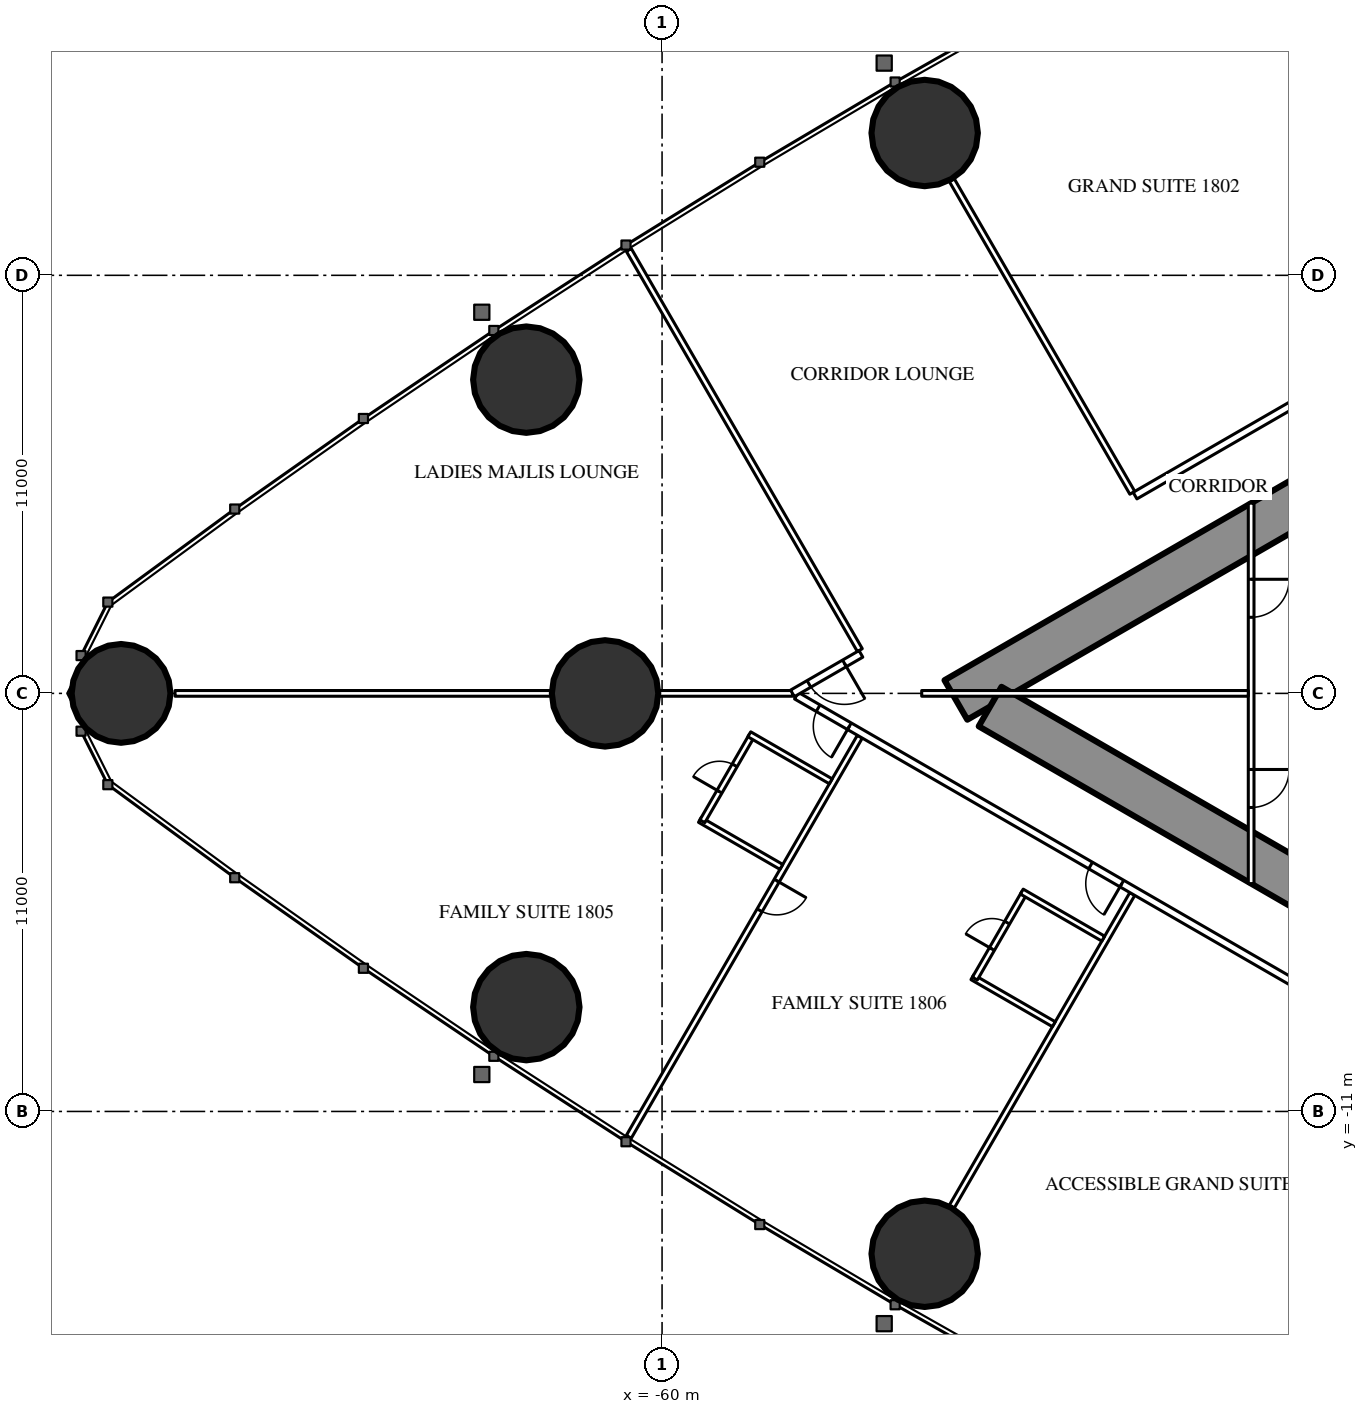
"""IFC4 building model, lengths in metres.
Left out: names, types, materials, properties, quantities, classifications, styles, units other than length and angle.
Written with IfcOpenShell. Run it as: python <this file> out.ifc"""

import sys

from ifc_helpers import new_model, si_unit, direction, frame, frame_2d, origin, origin_2d, place, context, subcontext, project, spatial, rectangle, hollow_circle, extrude, element, fill, save


model = new_model("IFC4")
c1 = context("Model", 3, precision=1e-05, world=origin(), true_north=direction((0.0, 1.0)))
c2 = subcontext(c1, "Body", "Model", "MODEL_VIEW")
j1 = project(units=[si_unit("LENGTHUNIT", "METRE"), si_unit("PLANEANGLEUNIT", "RADIAN")], contexts=[c1])
p1 = place(None, origin())
s1 = spatial("IfcSite", under=j1, at=p1, CompositionType="ELEMENT")
p2 = place(p1, origin())
s2 = spatial("IfcBuilding", under=s1, at=p2, CompositionType="ELEMENT")
p3 = place(p2, frame((0.0, 0.0, 70.5)))
s3 = spatial("IfcBuildingStorey", under=s2, at=p3, CompositionType="ELEMENT", Elevation=70.5)
p4 = place(p3, frame((-74.235, 0.0, 0.0), z_axis=(0.0, 0.0, 1.0), x_axis=(1.0, 0.0, 0.0)))
e1 = element("IfcColumn", 1, at=p4, inside=s3, PredefinedType="COLUMN", context=c2, shape_type="SweptSolid", body=[
    extrude(hollow_circle(Radius=1.3, WallThickness=0.1, at=origin_2d()), origin(), (0.0, 0.0, 1.0), 3.5),
])
for number, where, z_axis, x_axis in (
    (2, (-63.572, -8.255, 0.0), (0.0, 0.0, 1.0), (1.0, 0.0, 0.0)),
    (3, (-53.09, -14.745, 0.0), (0.0, 0.0, 1.0), (1.0, 0.0, 0.0)),
    (4, (-53.09, 14.745, 0.0), (0.0, 0.0, 1.0), (1.0, 0.0, 0.0)),
    (5, (-63.572, 8.255, 0.0), (0.0, 0.0, 1.0), (1.0, 0.0, 0.0)),
):
    element("IfcColumn", number, at=place(p3, frame(where, z_axis=z_axis, x_axis=x_axis)), inside=s3, PredefinedType="COLUMN", context=c2, shape_type="SweptSolid", body=[
        extrude(hollow_circle(Radius=1.4, WallThickness=0.12, at=origin_2d()), origin(), (0.0, 0.0, 1.0), 3.5),
    ])
p5 = place(p3, frame((-61.5, 0.0, 0.0), z_axis=(0.0, 0.0, 1.0), x_axis=(1.0, 0.0, 0.0)))
e6 = element("IfcColumn", 6, at=p5, inside=s3, PredefinedType="COLUMN", context=c2, shape_type="SweptSolid", body=[
    extrude(hollow_circle(Radius=1.4, WallThickness=0.1, at=origin_2d()), origin(), (0.0, 0.0, 1.0), 3.5),
])
p6 = place(p3, frame((-27.2, 14.3, 0.0), z_axis=(0.0, 0.0, 1.0), x_axis=(-0.866026593062, -0.499997940104, 0.0)))
e7 = element("IfcWall", 7, at=p6, inside=s3, PredefinedType="SHEAR", context=c2, shape_type="SweptSolid", body=[
    extrude(rectangle(XDim=28.946, YDim=1.2, at=frame_2d((14.473, 0.0))), origin(), (0.0, 0.0, 1.0), 3.5),
])
p7 = place(p6, frame((4.6, 0.0, 0.0)))
e8 = element("IfcOpeningElement", 8, at=p7, cuts=e7, PredefinedType="OPENING", context=c2, shape_type="SweptSolid", body=[
    extrude(rectangle(XDim=1.0, YDim=2.2, at=frame_2d((0.5, 1.1))), frame((0.0, 0.61, 0.0), z_axis=(0.0, -1.0, 0.0), x_axis=(1.0, 0.0, 0.0)), (0.0, 0.0, 1.0), 1.22),
])
p8 = place(p6, frame((13.395, 0.0, 0.0)))
e9 = element("IfcOpeningElement", 9, at=p8, cuts=e7, PredefinedType="OPENING", context=c2, shape_type="SweptSolid", body=[
    extrude(rectangle(XDim=1.8, YDim=2.2, at=frame_2d((0.9, 1.1))), frame((0.0, 0.61, 0.0), z_axis=(0.0, -1.0, 0.0), x_axis=(1.0, 0.0, 0.0)), (0.0, 0.0, 1.0), 1.22),
])
p9 = place(p3, frame((-27.2, -14.3, 0.0), z_axis=(0.0, 0.0, 1.0), x_axis=(-0.866024021859, 0.500002393557, 0.0)))
e10 = element("IfcWall", 10, at=p9, inside=s3, PredefinedType="SHEAR", context=c2, shape_type="SweptSolid", body=[
    extrude(rectangle(XDim=27.907, YDim=1.2, at=frame_2d((13.954, 0.0))), origin(), (0.0, 0.0, 1.0), 3.5),
])
p10 = place(p9, frame((4.6, 0.0, 0.0)))
e11 = element("IfcOpeningElement", 11, at=p10, cuts=e10, PredefinedType="OPENING", context=c2, shape_type="SweptSolid", body=[
    extrude(rectangle(XDim=1.0, YDim=2.2, at=frame_2d((0.5, 1.1))), frame((0.0, 0.61, 0.0), z_axis=(0.0, -1.0, 0.0), x_axis=(1.0, 0.0, 0.0)), (0.0, 0.0, 1.0), 1.22),
])
p11 = place(p9, frame((13.395, 0.0, 0.0)))
e12 = element("IfcOpeningElement", 12, at=p11, cuts=e10, PredefinedType="OPENING", context=c2, shape_type="SweptSolid", body=[
    extrude(rectangle(XDim=1.8, YDim=2.2, at=frame_2d((0.9, 1.1))), frame((0.0, 0.61, 0.0), z_axis=(0.0, -1.0, 0.0), x_axis=(1.0, 0.0, 0.0)), (0.0, 0.0, 1.0), 1.22),
])
p12 = place(p3, frame((-47.627, 5.278, 0.0), z_axis=(0.0, 0.0, 1.0), x_axis=(-0.500009844318, 0.86601972009, 0.0)))
e13 = element("IfcWall", 13, at=p12, inside=s3, PredefinedType="PARTITIONING", context=c2, shape_type="SweptSolid", body=[
    extrude(rectangle(XDim=9.51, YDim=0.15, at=frame_2d((4.755, 0.0))), origin(), (0.0, 0.0, 1.0), 2.25),
])
p13 = place(p3, frame((-54.796, 1.139, 0.0), z_axis=(0.0, 0.0, 1.0), x_axis=(-0.499998860433, 0.866026061713, 0.0)))
e14 = element("IfcWall", 14, at=p13, inside=s3, PredefinedType="PARTITIONING", context=c2, shape_type="SweptSolid", body=[
    extrude(rectangle(XDim=12.157, YDim=0.15, at=frame_2d((6.078, 0.0))), origin(), (0.0, 0.0, 1.0), 3.25),
])
p14 = place(p3, frame((-47.627, -5.278, 0.0), z_axis=(0.0, 0.0, 1.0), x_axis=(-0.500009844318, -0.86601972009, 0.0)))
e15 = element("IfcWall", 15, at=p14, inside=s3, PredefinedType="PARTITIONING", context=c2, shape_type="SweptSolid", body=[
    extrude(rectangle(XDim=9.51, YDim=0.15, at=frame_2d((4.755, 0.0))), origin(), (0.0, 0.0, 1.0), 2.25),
])
p15 = place(p3, frame((-54.796, -1.139, 0.0), z_axis=(0.0, 0.0, 1.0), x_axis=(-0.499998860433, -0.866026061713, 0.0)))
e16 = element("IfcWall", 16, at=p15, inside=s3, PredefinedType="PARTITIONING", context=c2, shape_type="SweptSolid", body=[
    extrude(rectangle(XDim=12.157, YDim=0.15, at=frame_2d((6.078, 0.0))), origin(), (0.0, 0.0, 1.0), 3.25),
])
p16 = place(p15, frame((4.375, 0.0, 0.0)))
e17 = element("IfcOpeningElement", 17, at=p16, cuts=e16, PredefinedType="OPENING", context=c2, shape_type="SweptSolid", body=[
    extrude(rectangle(XDim=0.9, YDim=2.2, at=frame_2d((0.45, 1.1))), frame((0.0, 0.085, 0.0), z_axis=(0.0, -1.0, 0.0), x_axis=(1.0, 0.0, 0.0)), (0.0, 0.0, 1.0), 0.17),
])
p17 = place(p3, frame((-56.568, 0.0, 0.0), z_axis=(0.0, 0.0, 1.0), x_axis=(-1.0, 0.0, 0.0)))
e18 = element("IfcWall", 18, at=p17, inside=s3, PredefinedType="PARTITIONING", context=c2, shape_type="SweptSolid", body=[
    extrude(rectangle(XDim=16.247, YDim=0.15, at=frame_2d((8.124, 0.0))), origin(), (0.0, 0.0, 1.0), 2.25),
])
p18 = place(p3, frame((-36.92, -11.344, 0.0), z_axis=(0.0, 0.0, 1.0), x_axis=(-0.866028313256, 0.499994960614, 0.0)))
e19 = element("IfcWall", 19, at=p18, inside=s3, PredefinedType="PARTITIONING", context=c2, shape_type="SweptSolid", body=[
    extrude(rectangle(XDim=22.568, YDim=0.2, at=frame_2d((11.284, 0.0))), origin(), (0.0, 0.0, 1.0), 3.25),
])
p19 = place(p18, frame((20.958, 0.0, 0.0)))
e20 = element("IfcOpeningElement", 20, at=p19, cuts=e19, PredefinedType="OPENING", context=c2, shape_type="SweptSolid", body=[
    extrude(rectangle(XDim=0.95, YDim=2.2, at=frame_2d((0.475, 1.1))), frame((0.0, 0.11, 0.0), z_axis=(0.0, -1.0, 0.0), x_axis=(1.0, 0.0, 0.0)), (0.0, 0.0, 1.0), 0.22),
])
p20 = place(p18, frame((12.68, 0.0, 0.0)))
e21 = element("IfcOpeningElement", 21, at=p20, cuts=e19, PredefinedType="OPENING", context=c2, shape_type="SweptSolid", body=[
    extrude(rectangle(XDim=0.95, YDim=2.2, at=frame_2d((0.475, 1.1))), frame((0.0, 0.11, 0.0), z_axis=(0.0, -1.0, 0.0), x_axis=(1.0, 0.0, 0.0)), (0.0, 0.0, 1.0), 0.22),
])
p21 = place(p18, frame((3.35, 0.0, 0.0)))
e22 = element("IfcOpeningElement", 22, at=p21, cuts=e19, PredefinedType="OPENING", context=c2, shape_type="SweptSolid", body=[
    extrude(rectangle(XDim=1.0, YDim=2.2, at=frame_2d((0.5, 1.1))), frame((0.0, 0.11, 0.0), z_axis=(0.0, -1.0, 0.0), x_axis=(1.0, 0.0, 0.0)), (0.0, 0.0, 1.0), 0.22),
])
p22 = place(p3, frame((-37.7, 10.894, 0.0), z_axis=(0.0, 0.0, 1.0), x_axis=(-0.866024459167, -0.500001636122, 0.0)))
e23 = element("IfcWall", 23, at=p22, inside=s3, PredefinedType="PARTITIONING", context=c2, shape_type="SweptSolid", body=[
    extrude(rectangle(XDim=11.38, YDim=0.2, at=frame_2d((5.69, 0.0))), origin(), (0.0, 0.0, 1.0), 3.25),
])
p23 = place(p22, frame((0.6, 0.0, 0.0)))
e24 = element("IfcOpeningElement", 24, at=p23, cuts=e23, PredefinedType="OPENING", context=c2, shape_type="SweptSolid", body=[
    extrude(rectangle(XDim=0.95, YDim=2.2, at=frame_2d((0.475, 1.1))), frame((0.0, 0.11, 0.0), z_axis=(0.0, -1.0, 0.0), x_axis=(1.0, 0.0, 0.0)), (0.0, 0.0, 1.0), 0.22),
])
p24 = place(p3, frame((-54.768, 1.04, 0.0), z_axis=(0.0, 0.0, 1.0), x_axis=(-0.866052632827, -0.499952834948, 0.0)))
e25 = element("IfcWall", 25, at=p24, inside=s3, PredefinedType="PARTITIONING", context=c2, shape_type="SweptSolid", body=[
    extrude(rectangle(XDim=2.079, YDim=0.2, at=frame_2d((1.04, 0.0))), origin(), (0.0, 0.0, 1.0), 3.25),
])
p25 = place(p24, frame((0.5, 0.0, 0.0)))
e26 = element("IfcOpeningElement", 26, at=p25, cuts=e25, PredefinedType="OPENING", context=c2, shape_type="SweptSolid", body=[
    extrude(rectangle(XDim=1.079, YDim=2.2, at=frame_2d((0.54, 1.1))), frame((0.0, 0.11, 0.0), z_axis=(0.0, -1.0, 0.0), x_axis=(1.0, 0.0, 0.0)), (0.0, 0.0, 1.0), 0.22),
])
p26 = place(p3, frame((-56.861, -4.565, 0.0), z_axis=(0.0, 0.0, 1.0), x_axis=(-0.86604923931, 0.499958713387, 0.0)))
e27 = element("IfcWall", 27, at=p26, inside=s3, PredefinedType="PARTITIONING", context=c2, shape_type="SweptSolid", body=[
    extrude(rectangle(XDim=2.475, YDim=0.15, at=frame_2d((1.237, 0.0))), origin(), (0.0, 0.0, 1.0), 3.25),
])
p27 = place(p3, frame((-57.639, -1.114, 0.0), z_axis=(0.0, 0.0, 1.0), x_axis=(-0.500006934395, -0.866021400173, 0.0)))
e28 = element("IfcWall", 28, at=p27, inside=s3, PredefinedType="PARTITIONING", context=c2, shape_type="SweptSolid", body=[
    extrude(rectangle(XDim=2.6, YDim=0.15, at=frame_2d((1.3, 0.0))), origin(), (0.0, 0.0, 1.0), 3.25),
])
p28 = place(p27, frame((0.9, 0.0, 0.0)))
e29 = element("IfcOpeningElement", 29, at=p28, cuts=e28, PredefinedType="OPENING", context=c2, shape_type="SweptSolid", body=[
    extrude(rectangle(XDim=0.8, YDim=2.2, at=frame_2d((0.4, 1.1))), frame((0.0, 0.085, 0.0), z_axis=(0.0, -1.0, 0.0), x_axis=(1.0, 0.0, 0.0)), (0.0, 0.0, 1.0), 0.17),
])
p29 = place(p3, frame((-55.561, -2.313, 0.0), z_axis=(0.0, 0.0, 1.0), x_axis=(-0.86604923931, 0.499958713387, 0.0)))
e30 = element("IfcWall", 30, at=p29, inside=s3, PredefinedType="PARTITIONING", context=c2, shape_type="SweptSolid", body=[
    extrude(rectangle(XDim=2.475, YDim=0.15, at=frame_2d((1.237, 0.0))), origin(), (0.0, 0.0, 1.0), 3.25),
])
p30 = place(p3, frame((-49.692, -8.704, 0.0), z_axis=(0.0, 0.0, 1.0), x_axis=(-0.866073894602, 0.499916002032, 0.0)))
e31 = element("IfcWall", 31, at=p30, inside=s3, PredefinedType="PARTITIONING", context=c2, shape_type="SweptSolid", body=[
    extrude(rectangle(XDim=2.475, YDim=0.15, at=frame_2d((1.238, 0.0))), origin(), (0.0, 0.0, 1.0), 3.25),
])
p31 = place(p3, frame((-50.47, -5.253, 0.0), z_axis=(0.0, 0.0, 1.0), x_axis=(-0.500006934395, -0.866021400173, 0.0)))
e32 = element("IfcWall", 32, at=p31, inside=s3, PredefinedType="PARTITIONING", context=c2, shape_type="SweptSolid", body=[
    extrude(rectangle(XDim=2.6, YDim=0.15, at=frame_2d((1.3, 0.0))), origin(), (0.0, 0.0, 1.0), 3.25),
])
p32 = place(p31, frame((0.9, 0.0, 0.0)))
e33 = element("IfcOpeningElement", 33, at=p32, cuts=e32, PredefinedType="OPENING", context=c2, shape_type="SweptSolid", body=[
    extrude(rectangle(XDim=0.8, YDim=2.2, at=frame_2d((0.4, 1.1))), frame((0.0, 0.085, 0.0), z_axis=(0.0, -1.0, 0.0), x_axis=(1.0, 0.0, 0.0)), (0.0, 0.0, 1.0), 0.17),
])
p33 = place(p3, frame((-48.392, -6.453, 0.0), z_axis=(0.0, 0.0, 1.0), x_axis=(-0.86604923931, 0.499958713387, 0.0)))
e34 = element("IfcWall", 34, at=p33, inside=s3, PredefinedType="PARTITIONING", context=c2, shape_type="SweptSolid", body=[
    extrude(rectangle(XDim=2.475, YDim=0.15, at=frame_2d((1.237, 0.0))), origin(), (0.0, 0.0, 1.0), 3.25),
])
p34 = place(p3, frame((-44.5, 5.005, 0.0), z_axis=(0.0, 0.0, 1.0), x_axis=(0.0, -1.0, 0.0)))
e35 = element("IfcWall", 35, at=p34, inside=s3, PredefinedType="PARTITIONING", context=c2, shape_type="SweptSolid", body=[
    extrude(rectangle(XDim=10.009, YDim=0.15, at=frame_2d((5.005, 0.0))), origin(), (0.0, 0.0, 1.0), 2.45),
])
p35 = place(p34, frame((2.002, 0.0, 0.0)))
e36 = element("IfcOpeningElement", 36, at=p35, cuts=e35, PredefinedType="OPENING", context=c2, shape_type="SweptSolid", body=[
    extrude(rectangle(XDim=1.0, YDim=2.2, at=frame_2d((0.5, 1.1))), frame((0.0, 0.085, 0.0), z_axis=(0.0, -1.0, 0.0), x_axis=(1.0, 0.0, 0.0)), (0.0, 0.0, 1.0), 0.17),
])
p36 = place(p34, frame((7.007, 0.0, 0.0)))
e37 = element("IfcOpeningElement", 37, at=p36, cuts=e35, PredefinedType="OPENING", context=c2, shape_type="SweptSolid", body=[
    extrude(rectangle(XDim=1.0, YDim=2.2, at=frame_2d((0.5, 1.1))), frame((0.0, 0.085, 0.0), z_axis=(0.0, -1.0, 0.0), x_axis=(1.0, 0.0, 0.0)), (0.0, 0.0, 1.0), 0.17),
])
p37 = place(p3, frame((-44.575, 0.0, 0.0), z_axis=(0.0, 0.0, 1.0), x_axis=(-1.0, 0.0, 0.0)))
e38 = element("IfcWall", 38, at=p37, inside=s3, PredefinedType="PARTITIONING", context=c2, shape_type="SweptSolid", body=[
    extrude(rectangle(XDim=8.593, YDim=0.15, at=frame_2d((4.297, 0.0))), origin(), (0.0, 0.0, 1.0), 2.25),
])
p38 = place(p25, origin())
e39 = element("IfcDoor", 39, at=p38, inside=s3, OperationType="SINGLE_SWING_LEFT", PredefinedType="DOOR", context=c2, shape_type="SweptSolid", body=[
    extrude(rectangle(XDim=1.079, YDim=2.2, at=frame_2d((0.54, 1.1))), frame((0.0, 0.025, 0.0), z_axis=(0.0, -1.0, 0.0), x_axis=(1.0, 0.0, 0.0)), (0.0, 0.0, 1.0), 0.05),
])
fill(e26, e39)
p39 = place(p28, origin())
e40 = element("IfcDoor", 40, at=p39, inside=s3, OperationType="SINGLE_SWING_RIGHT", PredefinedType="DOOR", context=c2, shape_type="SweptSolid", body=[
    extrude(rectangle(XDim=0.8, YDim=2.2, at=frame_2d((0.4, 1.1))), frame((0.0, 0.025, 0.0), z_axis=(0.0, -1.0, 0.0), x_axis=(1.0, 0.0, 0.0)), (0.0, 0.0, 1.0), 0.05),
])
fill(e29, e40)
p40 = place(p19, origin())
e41 = element("IfcDoor", 41, at=p40, inside=s3, OperationType="SINGLE_SWING_LEFT", PredefinedType="DOOR", context=c2, shape_type="SweptSolid", body=[
    extrude(rectangle(XDim=0.95, YDim=2.2, at=frame_2d((0.475, 1.1))), frame((0.0, 0.025, 0.0), z_axis=(0.0, -1.0, 0.0), x_axis=(1.0, 0.0, 0.0)), (0.0, 0.0, 1.0), 0.05),
])
fill(e20, e41)
p41 = place(p32, origin())
e42 = element("IfcDoor", 42, at=p41, inside=s3, OperationType="SINGLE_SWING_RIGHT", PredefinedType="DOOR", context=c2, shape_type="SweptSolid", body=[
    extrude(rectangle(XDim=0.8, YDim=2.2, at=frame_2d((0.4, 1.1))), frame((0.0, 0.025, 0.0), z_axis=(0.0, -1.0, 0.0), x_axis=(1.0, 0.0, 0.0)), (0.0, 0.0, 1.0), 0.05),
])
fill(e33, e42)
p42 = place(p20, origin())
e43 = element("IfcDoor", 43, at=p42, inside=s3, OperationType="SINGLE_SWING_LEFT", PredefinedType="DOOR", context=c2, shape_type="SweptSolid", body=[
    extrude(rectangle(XDim=0.95, YDim=2.2, at=frame_2d((0.475, 1.1))), frame((0.0, 0.025, 0.0), z_axis=(0.0, -1.0, 0.0), x_axis=(1.0, 0.0, 0.0)), (0.0, 0.0, 1.0), 0.05),
])
fill(e21, e43)
p43 = place(p16, origin())
e44 = element("IfcDoor", 44, at=p43, inside=s3, OperationType="SINGLE_SWING_LEFT", PredefinedType="DOOR", context=c2, shape_type="SweptSolid", body=[
    extrude(rectangle(XDim=0.9, YDim=2.2, at=frame_2d((0.45, 1.1))), frame((0.0, 0.025, 0.0), z_axis=(0.0, -1.0, 0.0), x_axis=(1.0, 0.0, 0.0)), (0.0, 0.0, 1.0), 0.05),
])
fill(e17, e44)
p44 = place(p35, origin())
e45 = element("IfcDoor", 45, at=p44, inside=s3, OperationType="SINGLE_SWING_LEFT", PredefinedType="DOOR", context=c2, shape_type="SweptSolid", body=[
    extrude(rectangle(XDim=1.0, YDim=2.2, at=frame_2d((0.5, 1.1))), frame((0.0, 0.025, 0.0), z_axis=(0.0, -1.0, 0.0), x_axis=(1.0, 0.0, 0.0)), (0.0, 0.0, 1.0), 0.05),
])
fill(e36, e45)
p45 = place(p36, origin())
e46 = element("IfcDoor", 46, at=p45, inside=s3, OperationType="SINGLE_SWING_LEFT", PredefinedType="DOOR", context=c2, shape_type="SweptSolid", body=[
    extrude(rectangle(XDim=1.0, YDim=2.2, at=frame_2d((0.5, 1.1))), frame((0.0, 0.025, 0.0), z_axis=(0.0, -1.0, 0.0), x_axis=(1.0, 0.0, 0.0)), (0.0, 0.0, 1.0), 0.05),
])
fill(e37, e46)
save(model, sys.argv[1])
